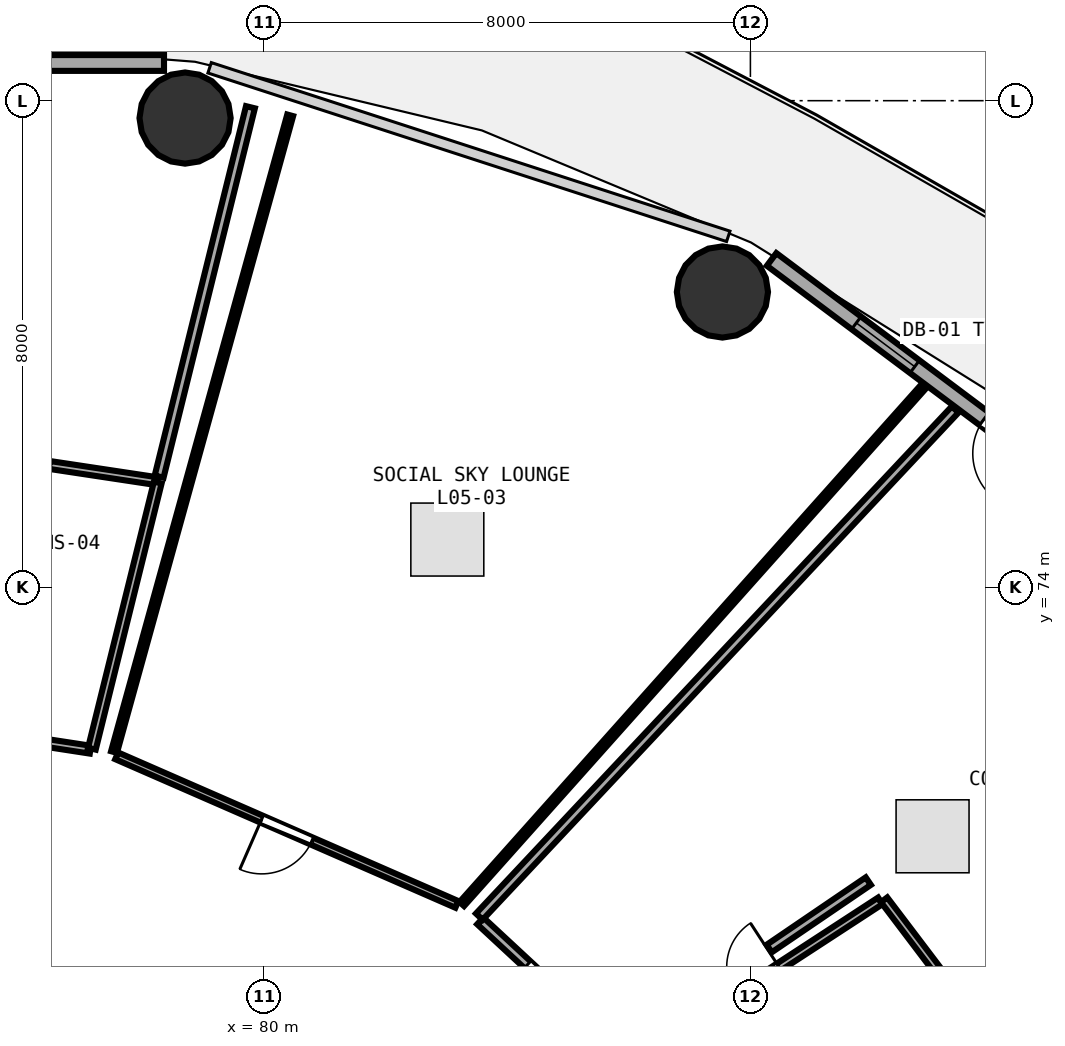
"""IFC4 building model, lengths in metres.
Left out: names, types, materials, properties, quantities, classifications, styles, units other than length and angle.
Written with IfcOpenShell. Run it as: python <this file> out.ifc"""

import sys

from ifc_helpers import new_model, si_unit, direction, frame, frame_2d, origin, origin_2d, place, context, subcontext, project, spatial, rectangle, circle, extrude, element, fill, save


model = new_model("IFC4")
c1 = context("Model", 3, precision=1e-05, world=origin(), true_north=direction((0.0, 1.0)))
c2 = subcontext(c1, "Body", "Model", "MODEL_VIEW")
j1 = project(units=[si_unit("LENGTHUNIT", "METRE"), si_unit("PLANEANGLEUNIT", "RADIAN")], contexts=[c1])
p1 = place(None, origin())
s1 = spatial("IfcSite", under=j1, at=p1, CompositionType="ELEMENT")
p2 = place(p1, origin())
s2 = spatial("IfcBuilding", under=s1, at=p2, CompositionType="ELEMENT")
p3 = place(p2, frame((0.0, 0.0, 22.5)))
s3 = spatial("IfcBuildingStorey", under=s2, at=p3, CompositionType="ELEMENT", Elevation=22.5)
for number, where, z_axis, x_axis in (
    (1, (87.54, 78.854, 0.0), (0.0, 0.0, 1.0), (1.0, 0.0, 0.0)),
    (2, (78.702, 81.714, 0.0), (0.0, 0.0, 1.0), (1.0, 0.0, 0.0)),
):
    element("IfcColumn", number, at=place(p3, frame(where, z_axis=z_axis, x_axis=x_axis)), inside=s3, PredefinedType="COLUMN", context=c2, shape_type="SweptSolid", body=[
        extrude(circle(Radius=0.75, at=origin_2d()), origin(), (0.0, 0.0, 1.0), 3.75),
    ])
p4 = place(p3, frame((94.984, 74.418, 0.0), z_axis=(0.0, 0.0, 1.0), x_axis=(-0.80030733173, 0.599590005569, 0.0)))
e3 = element("IfcWall", 3, at=p4, inside=s3, PredefinedType="SOLIDWALL", context=c2, shape_type="SweptSolid", body=[
    extrude(rectangle(XDim=8.291, YDim=0.26, at=frame_2d((4.145, 0.0))), origin(), (0.0, 0.0, 1.0), 3.475),
])
p5 = place(p4, frame((2.97, 0.0, 0.0)))
e4 = element("IfcOpeningElement", 4, at=p5, cuts=e3, PredefinedType="OPENING", context=c2, shape_type="SweptSolid", body=[
    extrude(rectangle(XDim=0.95, YDim=2.1, at=frame_2d((0.475, 1.05))), frame((0.0, 0.14, 0.0), z_axis=(0.0, -1.0, 0.0), x_axis=(1.0, 0.0, 0.0)), (0.0, 0.0, 1.0), 0.28),
])
p6 = place(p4, frame((5.35, 0.0, 0.85)))
e5 = element("IfcOpeningElement", 5, at=p6, cuts=e3, PredefinedType="OPENING", context=c2, shape_type="SweptSolid", body=[
    extrude(rectangle(XDim=1.2, YDim=1.45, at=frame_2d((0.6, 0.725))), frame((0.0, 0.14, 0.0), z_axis=(0.0, -1.0, 0.0), x_axis=(1.0, 0.0, 0.0)), (0.0, 0.0, 1.0), 0.28),
])
p7 = place(p3, frame((78.356, 82.62, 0.0), z_axis=(0.0, 0.0, 1.0), x_axis=(-1.0, 0.0, 0.0)))
e6 = element("IfcWall", 6, at=p7, inside=s3, PredefinedType="SOLIDWALL", context=c2, shape_type="SweptSolid", body=[
    extrude(rectangle(XDim=8.712, YDim=0.26, at=frame_2d((4.356, 0.0))), origin(), (0.0, 0.0, 1.0), 3.475),
])
p8 = place(p7, frame((3.556, 0.0, 0.85)))
e7 = element("IfcOpeningElement", 7, at=p8, cuts=e6, PredefinedType="OPENING", context=c2, shape_type="SweptSolid", body=[
    extrude(rectangle(XDim=1.6, YDim=1.45, at=frame_2d((0.8, 0.725))), frame((0.0, 0.14, 0.0), z_axis=(0.0, -1.0, 0.0), x_axis=(1.0, 0.0, 0.0)), (0.0, 0.0, 1.0), 0.28),
])
p9 = place(p3, frame((86.083, 66.2, 0.0), z_axis=(0.0, 0.0, 1.0), x_axis=(0.837796261941, 0.545982988267, 0.0)))
e8 = element("IfcWall", 8, at=p9, inside=s3, PredefinedType="PLUMBINGWALL", context=c2, shape_type="SweptSolid", body=[
    extrude(rectangle(XDim=4.838, YDim=0.13, at=frame_2d((2.419, 0.0))), origin(), (0.0, 0.0, 1.0), 3.235),
])
p10 = place(p9, frame((1.989, 0.0, 0.0)))
e9 = element("IfcOpeningElement", 9, at=p10, cuts=e8, PredefinedType="OPENING", context=c2, shape_type="SweptSolid", body=[
    extrude(rectangle(XDim=0.86, YDim=2.05, at=frame_2d((0.43, 1.025))), frame((0.0, 0.075, 0.0), z_axis=(0.0, -1.0, 0.0), x_axis=(1.0, 0.0, 0.0)), (0.0, 0.0, 1.0), 0.15),
])
p11 = place(p3, frame((85.806, 66.425, 0.0), z_axis=(0.0, 0.0, 1.0), x_axis=(-0.7329267348, 0.680307578538, 0.0)))
e10 = element("IfcWall", 10, at=p11, inside=s3, PredefinedType="PARTITIONING", context=c2, shape_type="SweptSolid", body=[
    extrude(rectangle(XDim=3.067, YDim=0.15, at=frame_2d((1.533, 0.0))), origin(), (0.0, 0.0, 1.0), 2.875),
])
p12 = place(p11, frame((1.059, 0.0, 0.0)))
e11 = element("IfcOpeningElement", 11, at=p12, cuts=e10, PredefinedType="OPENING", context=c2, shape_type="SweptSolid", body=[
    extrude(rectangle(XDim=0.95, YDim=2.08, at=frame_2d((0.475, 1.04))), frame((0.0, 0.085, 0.0), z_axis=(0.0, -1.0, 0.0), x_axis=(1.0, 0.0, 0.0)), (0.0, 0.0, 1.0), 0.17),
])
p13 = place(p3, frame((83.172, 68.783, 0.0), z_axis=(0.0, 0.0, 1.0), x_axis=(-0.916419655578, 0.400218708797, 0.0)))
e12 = element("IfcWall", 12, at=p13, inside=s3, PredefinedType="PARTITIONING", context=c2, shape_type="SweptSolid", body=[
    extrude(rectangle(XDim=6.104, YDim=0.12, at=frame_2d((3.052, 0.0))), origin(), (0.0, 0.0, 1.0), 2.875),
])
p14 = place(p13, frame((2.602, 0.0, 0.0)))
e13 = element("IfcOpeningElement", 13, at=p14, cuts=e12, PredefinedType="OPENING", context=c2, shape_type="SweptSolid", body=[
    extrude(rectangle(XDim=0.9, YDim=2.08, at=frame_2d((0.45, 1.04))), frame((0.0, 0.07, 0.0), z_axis=(0.0, -1.0, 0.0), x_axis=(1.0, 0.0, 0.0)), (0.0, 0.0, 1.0), 0.14),
])
p15 = place(p3, frame((87.657, 63.778, 0.0), z_axis=(0.0, 0.0, 1.0), x_axis=(0.926333713065, 0.376703931542, 0.0)))
e14 = element("IfcWall", 14, at=p15, inside=s3, PredefinedType="PARTITIONING", context=c2, shape_type="SweptSolid", body=[
    extrude(rectangle(XDim=12.099, YDim=0.15, at=frame_2d((6.05, 0.0))), origin(), (0.0, 0.0, 1.0), 2.875),
])
p16 = place(p3, frame((90.199, 68.858, 0.0), z_axis=(0.0, 0.0, 1.0), x_axis=(0.60376191721, -0.797164692725, 0.0)))
e15 = element("IfcWall", 15, at=p16, inside=s3, PredefinedType="PLUMBINGWALL", context=c2, shape_type="SweptSolid", body=[
    extrude(rectangle(XDim=1.669, YDim=0.13, at=frame_2d((0.834, 0.0))), origin(), (0.0, 0.0, 1.0), 3.175),
])
p17 = place(p3, frame((83.542, 68.581, 0.0), z_axis=(0.0, 0.0, 1.0), x_axis=(0.684261294523, 0.729236916796, 0.0)))
e16 = element("IfcWall", 16, at=p17, inside=s3, PredefinedType="PARTITIONING", context=c2, shape_type="SweptSolid", body=[
    extrude(rectangle(XDim=11.438, YDim=0.15, at=frame_2d((5.719, 0.0))), origin(), (0.0, 0.0, 1.0), 2.875),
])
p18 = place(p3, frame((89.939, 69.166, 0.0), z_axis=(0.0, 0.0, 1.0), x_axis=(-0.826811291248, -0.562479411769, 0.0)))
e17 = element("IfcWall", 17, at=p18, inside=s3, PredefinedType="PARTITIONING", context=c2, shape_type="SweptSolid", body=[
    extrude(rectangle(XDim=1.971, YDim=0.15, at=frame_2d((0.985, 0.0))), origin(), (0.0, 0.0, 1.0), 3.48),
])
p19 = place(p3, frame((77.534, 71.289, 0.0), z_axis=(0.0, 0.0, 1.0), x_axis=(0.26671307518, 0.963775977875, 0.0)))
e18 = element("IfcWall", 18, at=p19, inside=s3, PredefinedType="PARTITIONING", context=c2, shape_type="SweptSolid", body=[
    extrude(rectangle(XDim=10.865, YDim=0.1, at=frame_2d((5.432, 0.0))), origin(), (0.0, 0.0, 1.0), 2.875),
])
p20 = place(p3, frame((90.844, 77.294, 0.0), z_axis=(0.0, 0.0, 1.0), x_axis=(-0.66580890104, -0.746122313897, 0.0)))
e19 = element("IfcWall", 19, at=p20, inside=s3, PredefinedType="PARTITIONING", context=c2, shape_type="SweptSolid", body=[
    extrude(rectangle(XDim=11.399, YDim=0.1, at=frame_2d((5.7, 0.0))), origin(), (0.0, 0.0, 1.0), 2.875),
])
p21 = place(p3, frame((77.145, 71.327, 0.0), z_axis=(0.0, 0.0, 1.0), x_axis=(-0.988427236939, 0.151695739152, 0.0)))
e20 = element("IfcWall", 20, at=p21, inside=s3, PredefinedType="PLUMBINGWALL", context=c2, shape_type="SweptSolid", body=[
    extrude(rectangle(XDim=1.32, YDim=0.13, at=frame_2d((0.66, 0.0))), origin(), (0.0, 0.0, 1.0), 3.235),
])
p22 = place(p3, frame((76.469, 76.01, 0.0), z_axis=(0.0, 0.0, 1.0), x_axis=(0.988799846431, -0.14924765894, 0.0)))
e21 = element("IfcWall", 21, at=p22, inside=s3, PredefinedType="PLUMBINGWALL", context=c2, shape_type="SweptSolid", body=[
    extrude(rectangle(XDim=1.79, YDim=0.13, at=frame_2d((0.895, 0.0))), origin(), (0.0, 0.0, 1.0), 3.48),
])
p23 = place(p3, frame((78.253, 75.721, 0.0), z_axis=(0.0, 0.0, 1.0), x_axis=(-0.240229117536, -0.970716215528, 0.0)))
e22 = element("IfcWall", 22, at=p23, inside=s3, PredefinedType="PLUMBINGWALL", context=c2, shape_type="SweptSolid", body=[
    extrude(rectangle(XDim=4.509, YDim=0.13, at=frame_2d((2.255, 0.0))), origin(), (0.0, 0.0, 1.0), 3.175),
])
p24 = place(p3, frame((79.777, 81.892, 0.0), z_axis=(0.0, 0.0, 1.0), x_axis=(-0.240000910349, -0.970772662899, 0.0)))
e23 = element("IfcWall", 23, at=p24, inside=s3, PredefinedType="PARTITIONING", context=c2, shape_type="SweptSolid", body=[
    extrude(rectangle(XDim=6.257, YDim=0.15, at=frame_2d((3.128, 0.0))), origin(), (0.0, 0.0, 1.0), 2.875),
])
p25 = place(p5, frame((0.95, 0.0, 0.0), z_axis=(0.0, 0.0, 1.0), x_axis=(-1.0, 0.0, 0.0)))
e24 = element("IfcDoor", 24, at=p25, inside=s3, OperationType="SINGLE_SWING_RIGHT", PredefinedType="DOOR", context=c2, shape_type="SweptSolid", body=[
    extrude(rectangle(XDim=0.95, YDim=2.1, at=frame_2d((0.475, 1.05))), frame((0.0, 0.025, 0.0), z_axis=(0.0, -1.0, 0.0), x_axis=(1.0, 0.0, 0.0)), (0.0, 0.0, 1.0), 0.05),
])
fill(e4, e24)
p26 = place(p6, origin())
e25 = element("IfcWindow", 25, at=p26, inside=s3, PartitioningType="SINGLE_PANEL", PredefinedType="WINDOW", context=c2, shape_type="SweptSolid", body=[
    extrude(rectangle(XDim=1.2, YDim=1.45, at=frame_2d((0.6, 0.725))), frame((0.0, 0.03, 0.0), z_axis=(0.0, -1.0, 0.0), x_axis=(1.0, 0.0, 0.0)), (0.0, 0.0, 1.0), 0.06),
])
fill(e5, e25)
p27 = place(p10, origin())
e26 = element("IfcDoor", 26, at=p27, inside=s3, OperationType="SINGLE_SWING_RIGHT", PredefinedType="DOOR", context=c2, shape_type="SweptSolid", body=[
    extrude(rectangle(XDim=0.86, YDim=2.05, at=frame_2d((0.43, 1.025))), frame((0.0, 0.025, 0.0), z_axis=(0.0, -1.0, 0.0), x_axis=(1.0, 0.0, 0.0)), (0.0, 0.0, 1.0), 0.05),
])
fill(e9, e26)
p28 = place(p12, origin())
e27 = element("IfcDoor", 27, at=p28, inside=s3, OperationType="SINGLE_SWING_LEFT", PredefinedType="DOOR", context=c2, shape_type="SweptSolid", body=[
    extrude(rectangle(XDim=0.95, YDim=2.08, at=frame_2d((0.475, 1.04))), frame((0.0, 0.025, 0.0), z_axis=(0.0, -1.0, 0.0), x_axis=(1.0, 0.0, 0.0)), (0.0, 0.0, 1.0), 0.05),
])
fill(e11, e27)
p29 = place(p14, origin())
e28 = element("IfcDoor", 28, at=p29, inside=s3, OperationType="SINGLE_SWING_RIGHT", PredefinedType="DOOR", context=c2, shape_type="SweptSolid", body=[
    extrude(rectangle(XDim=0.9, YDim=2.08, at=frame_2d((0.45, 1.04))), frame((0.0, 0.025, 0.0), z_axis=(0.0, -1.0, 0.0), x_axis=(1.0, 0.0, 0.0)), (0.0, 0.0, 1.0), 0.05),
])
fill(e13, e28)
save(model, sys.argv[1])
